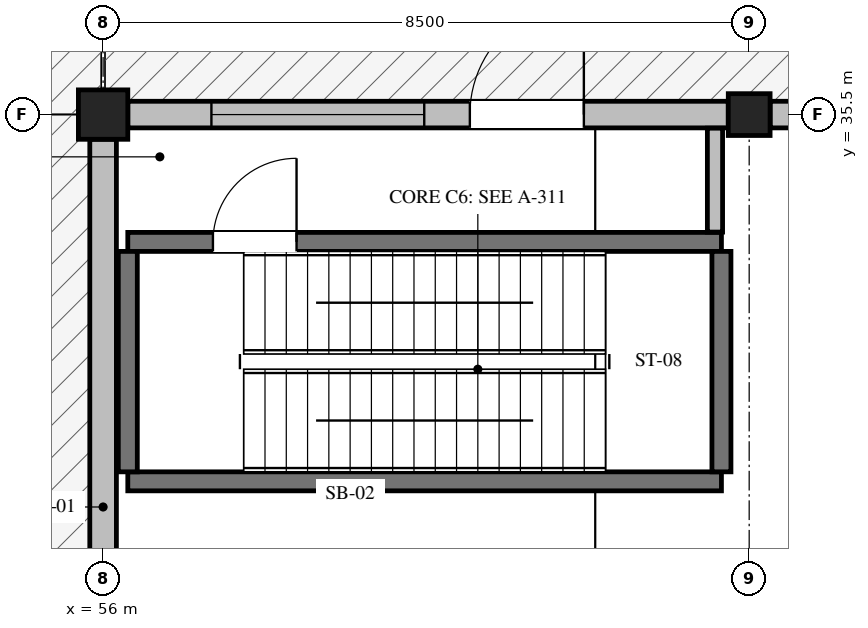
"""IFC4 building model, lengths in metres.
Left out: names, types, materials, properties, quantities, classifications, styles, units other than length and angle.
Written with IfcOpenShell. Run it as: python <this file> out.ifc"""

import sys

from ifc_helpers import new_model, si_unit, direction, frame, frame_2d, origin, origin_2d, place, context, subcontext, project, spatial, rectangle, hollow_rectangle, extrude, element, fill, save


model = new_model("IFC4")
c1 = context("Model", 3, precision=1e-05, world=origin(), true_north=direction((0.0, 1.0)))
c2 = subcontext(c1, "Body", "Model", "MODEL_VIEW")
j1 = project(units=[si_unit("LENGTHUNIT", "METRE"), si_unit("PLANEANGLEUNIT", "RADIAN")], contexts=[c1])
p1 = place(None, origin())
s1 = spatial("IfcSite", under=j1, at=p1, CompositionType="ELEMENT")
p2 = place(p1, origin())
s2 = spatial("IfcBuilding", under=s1, at=p2, CompositionType="ELEMENT")
p3 = place(p2, frame((0.0, 0.0, 0.45)))
s3 = spatial("IfcBuildingStorey", under=s2, at=p3, CompositionType="ELEMENT", Elevation=0.45)
p4 = place(p3, frame((56.0, 35.5, -0.45), z_axis=(0.0, 0.0, 1.0), x_axis=(1.0, 0.0, 0.0)))
e1 = element("IfcColumn", 1, at=p4, inside=s3, PredefinedType="COLUMN", context=c2, shape_type="SweptSolid", body=[
    extrude(hollow_rectangle(XDim=0.65, YDim=0.65, WallThickness=0.032, at=origin_2d()), origin(), (0.0, 0.0, 1.0), 5.85),
])
p5 = place(p3, frame((64.5, 35.5, -0.45), z_axis=(0.0, 0.0, 1.0), x_axis=(1.0, 0.0, 0.0)))
e2 = element("IfcColumn", 2, at=p5, inside=s3, PredefinedType="COLUMN", context=c2, shape_type="SweptSolid", body=[
    extrude(hollow_rectangle(XDim=0.55, YDim=0.55, WallThickness=0.026, at=origin_2d()), origin(), (0.0, 0.0, 1.0), 5.85),
])
p6 = place(p3, frame((56.325, 35.5, 0.0), z_axis=(0.0, 0.0, 1.0), x_axis=(1.0, 0.0, 0.0)))
e3 = element("IfcWall", 3, at=p6, inside=s3, PredefinedType="SOLIDWALL", context=c2, shape_type="SweptSolid", body=[
    extrude(rectangle(XDim=7.9, YDim=0.35, at=frame_2d((3.95, 0.0))), origin(), (0.0, 0.0, 1.0), 4.644),
])
p7 = place(p6, frame((4.5, 0.0, 0.0)))
e4 = element("IfcOpeningElement", 4, at=p7, cuts=e3, PredefinedType="OPENING", context=c2, shape_type="SweptSolid", body=[
    extrude(rectangle(XDim=1.5, YDim=2.4, at=frame_2d((0.75, 1.2))), frame((0.0, 0.185, 0.0), z_axis=(0.0, -1.0, 0.0), x_axis=(1.0, 0.0, 0.0)), (0.0, 0.0, 1.0), 0.37),
])
p8 = place(p6, frame((1.1, 0.0, 1.8)))
e5 = element("IfcOpeningElement", 5, at=p8, cuts=e3, PredefinedType="OPENING", context=c2, shape_type="SweptSolid", body=[
    extrude(rectangle(XDim=2.8, YDim=1.2, at=frame_2d((1.4, 0.6))), frame((0.0, 0.185, 0.0), z_axis=(0.0, -1.0, 0.0), x_axis=(1.0, 0.0, 0.0)), (0.0, 0.0, 1.0), 0.37),
])
p9 = place(p3, frame((64.775, 35.5, 0.0), z_axis=(0.0, 0.0, 1.0), x_axis=(1.0, 0.0, 0.0)))
e6 = element("IfcWall", 6, at=p9, inside=s3, PredefinedType="SOLIDWALL", context=c2, shape_type="SweptSolid", body=[
    extrude(rectangle(XDim=7.9, YDim=0.35, at=frame_2d((3.95, 0.0))), origin(), (0.0, 0.0, 1.0), 4.694),
])
p10 = place(p9, frame((1.8, 0.0, 0.0)))
e7 = element("IfcOpeningElement", 7, at=p10, cuts=e6, PredefinedType="OPENING", context=c2, shape_type="SweptSolid", body=[
    extrude(rectangle(XDim=4.3, YDim=4.5, at=frame_2d((2.15, 2.25))), frame((0.0, 0.185, 0.0), z_axis=(0.0, -1.0, 0.0), x_axis=(1.0, 0.0, 0.0)), (0.0, 0.0, 1.0), 0.37),
])
p11 = place(p3, frame((56.0, 6.825, 0.0), z_axis=(0.0, 0.0, 1.0), x_axis=(0.0, 1.0, 0.0)))
e8 = element("IfcWall", 8, at=p11, inside=s3, PredefinedType="SOLIDWALL", context=c2, shape_type="SweptSolid", body=[
    extrude(rectangle(XDim=28.35, YDim=0.35, at=frame_2d((14.175, 0.0))), origin(), (0.0, 0.0, 1.0), 4.794),
])
p12 = place(p11, frame((4.2, 0.0, 0.0)))
e9 = element("IfcOpeningElement", 9, at=p12, cuts=e8, PredefinedType="OPENING", context=c2, shape_type="SweptSolid", body=[
    extrude(rectangle(XDim=1.7, YDim=2.35, at=frame_2d((0.85, 1.175))), frame((0.0, 0.185, 0.0), z_axis=(0.0, -1.0, 0.0), x_axis=(1.0, 0.0, 0.0)), (0.0, 0.0, 1.0), 0.37),
])
p13 = place(p11, frame((15.5, 0.0, 0.0)))
e10 = element("IfcOpeningElement", 10, at=p13, cuts=e8, PredefinedType="OPENING", context=c2, shape_type="SweptSolid", body=[
    extrude(rectangle(XDim=1.55, YDim=2.3, at=frame_2d((0.775, 1.15))), frame((0.0, 0.185, 0.0), z_axis=(0.0, -1.0, 0.0), x_axis=(1.0, 0.0, 0.0)), (0.0, 0.0, 1.0), 0.37),
])
p14 = place(p11, frame((8.0, 0.0, 1.4)))
e11 = element("IfcOpeningElement", 11, at=p14, cuts=e8, PredefinedType="OPENING", context=c2, shape_type="SweptSolid", body=[
    extrude(rectangle(XDim=1.1, YDim=1.65, at=frame_2d((0.55, 0.825))), frame((0.0, 0.185, 0.0), z_axis=(0.0, -1.0, 0.0), x_axis=(1.0, 0.0, 0.0)), (0.0, 0.0, 1.0), 0.37),
])
p15 = place(p11, frame((11.5, 0.0, 1.4)))
e12 = element("IfcOpeningElement", 12, at=p15, cuts=e8, PredefinedType="OPENING", context=c2, shape_type="SweptSolid", body=[
    extrude(rectangle(XDim=1.4, YDim=1.65, at=frame_2d((0.7, 0.825))), frame((0.0, 0.185, 0.0), z_axis=(0.0, -1.0, 0.0), x_axis=(1.0, 0.0, 0.0)), (0.0, 0.0, 1.0), 0.37),
])
p16 = place(p11, frame((20.0, 0.0, 1.4)))
e13 = element("IfcOpeningElement", 13, at=p16, cuts=e8, PredefinedType="OPENING", context=c2, shape_type="SweptSolid", body=[
    extrude(rectangle(XDim=1.25, YDim=1.65, at=frame_2d((0.625, 0.825))), frame((0.0, 0.185, 0.0), z_axis=(0.0, -1.0, 0.0), x_axis=(1.0, 0.0, 0.0)), (0.0, 0.0, 1.0), 0.37),
])
p17 = place(p3, frame((56.325, 30.675, 0.0), z_axis=(0.0, 0.0, 1.0), x_axis=(1.0, 0.0, 0.0)))
e14 = element("IfcWall", 14, at=p17, inside=s3, PredefinedType="SHEAR", context=c2, shape_type="SweptSolid", body=[
    extrude(rectangle(XDim=7.81, YDim=0.25, at=frame_2d((3.905, 0.0))), origin(), (0.0, 0.0, 1.0), 5.2),
])
p18 = place(p3, frame((56.325, 33.825, 0.0), z_axis=(0.0, 0.0, 1.0), x_axis=(1.0, 0.0, 0.0)))
e15 = element("IfcWall", 15, at=p18, inside=s3, PredefinedType="SHEAR", context=c2, shape_type="SweptSolid", body=[
    extrude(rectangle(XDim=7.81, YDim=0.25, at=frame_2d((3.905, 0.0))), origin(), (0.0, 0.0, 1.0), 5.2),
])
p19 = place(p18, frame((1.12, 0.0, 0.0)))
e16 = element("IfcOpeningElement", 16, at=p19, cuts=e15, PredefinedType="OPENING", context=c2, shape_type="SweptSolid", body=[
    extrude(rectangle(XDim=1.1, YDim=2.15, at=frame_2d((0.55, 1.075))), frame((0.0, 0.135, 0.0), z_axis=(0.0, -1.0, 0.0), x_axis=(1.0, 0.0, 0.0)), (0.0, 0.0, 1.0), 0.27),
])
for number, where, z_axis, x_axis in (
    (17, (56.325, 30.8, 0.0), (0.0, 0.0, 1.0), (0.0, 1.0, 0.0)),
    (18, (64.135, 30.8, 0.0), (0.0, 0.0, 1.0), (0.0, 1.0, 0.0)),
):
    element("IfcWall", number, at=place(p3, frame(where, z_axis=z_axis, x_axis=x_axis)), inside=s3, PredefinedType="SHEAR", context=c2, shape_type="SweptSolid", body=[
        extrude(rectangle(XDim=2.9, YDim=0.25, at=frame_2d((1.45, 0.0))), origin(), (0.0, 0.0, 1.0), 5.2),
    ])
p20 = place(p3, frame((64.05, 33.954, 0.0), z_axis=(0.0, 0.0, 1.0), x_axis=(0.0, 1.0, 0.0)))
e19 = element("IfcWall", 19, at=p20, inside=s3, PredefinedType="PARTITIONING", context=c2, shape_type="SweptSolid", body=[
    extrude(rectangle(XDim=1.367, YDim=0.2, at=frame_2d((0.684, 0.0))), origin(), (0.0, 0.0, 1.0), 4.73),
])
p21 = place(p7, origin())
e20 = element("IfcDoor", 20, at=p21, inside=s3, OperationType="SINGLE_SWING_RIGHT", PredefinedType="DOOR", context=c2, shape_type="SweptSolid", body=[
    extrude(rectangle(XDim=1.5, YDim=2.4, at=frame_2d((0.75, 1.2))), frame((0.0, 0.025, 0.0), z_axis=(0.0, -1.0, 0.0), x_axis=(1.0, 0.0, 0.0)), (0.0, 0.0, 1.0), 0.05),
])
fill(e4, e20)
p22 = place(p8, origin())
e21 = element("IfcWindow", 21, at=p22, inside=s3, PartitioningType="SINGLE_PANEL", PredefinedType="WINDOW", context=c2, shape_type="SweptSolid", body=[
    extrude(rectangle(XDim=2.8, YDim=1.2, at=frame_2d((1.4, 0.6))), frame((0.0, 0.03, 0.0), z_axis=(0.0, -1.0, 0.0), x_axis=(1.0, 0.0, 0.0)), (0.0, 0.0, 1.0), 0.06),
])
fill(e5, e21)
p23 = place(p19, origin())
e22 = element("IfcDoor", 22, at=p23, inside=s3, OperationType="SINGLE_SWING_RIGHT", PredefinedType="DOOR", context=c2, shape_type="SweptSolid", body=[
    extrude(rectangle(XDim=1.1, YDim=2.15, at=frame_2d((0.55, 1.075))), frame((0.0, 0.025, 0.0), z_axis=(0.0, -1.0, 0.0), x_axis=(1.0, 0.0, 0.0)), (0.0, 0.0, 1.0), 0.05),
])
fill(e16, e22)
save(model, sys.argv[1])
